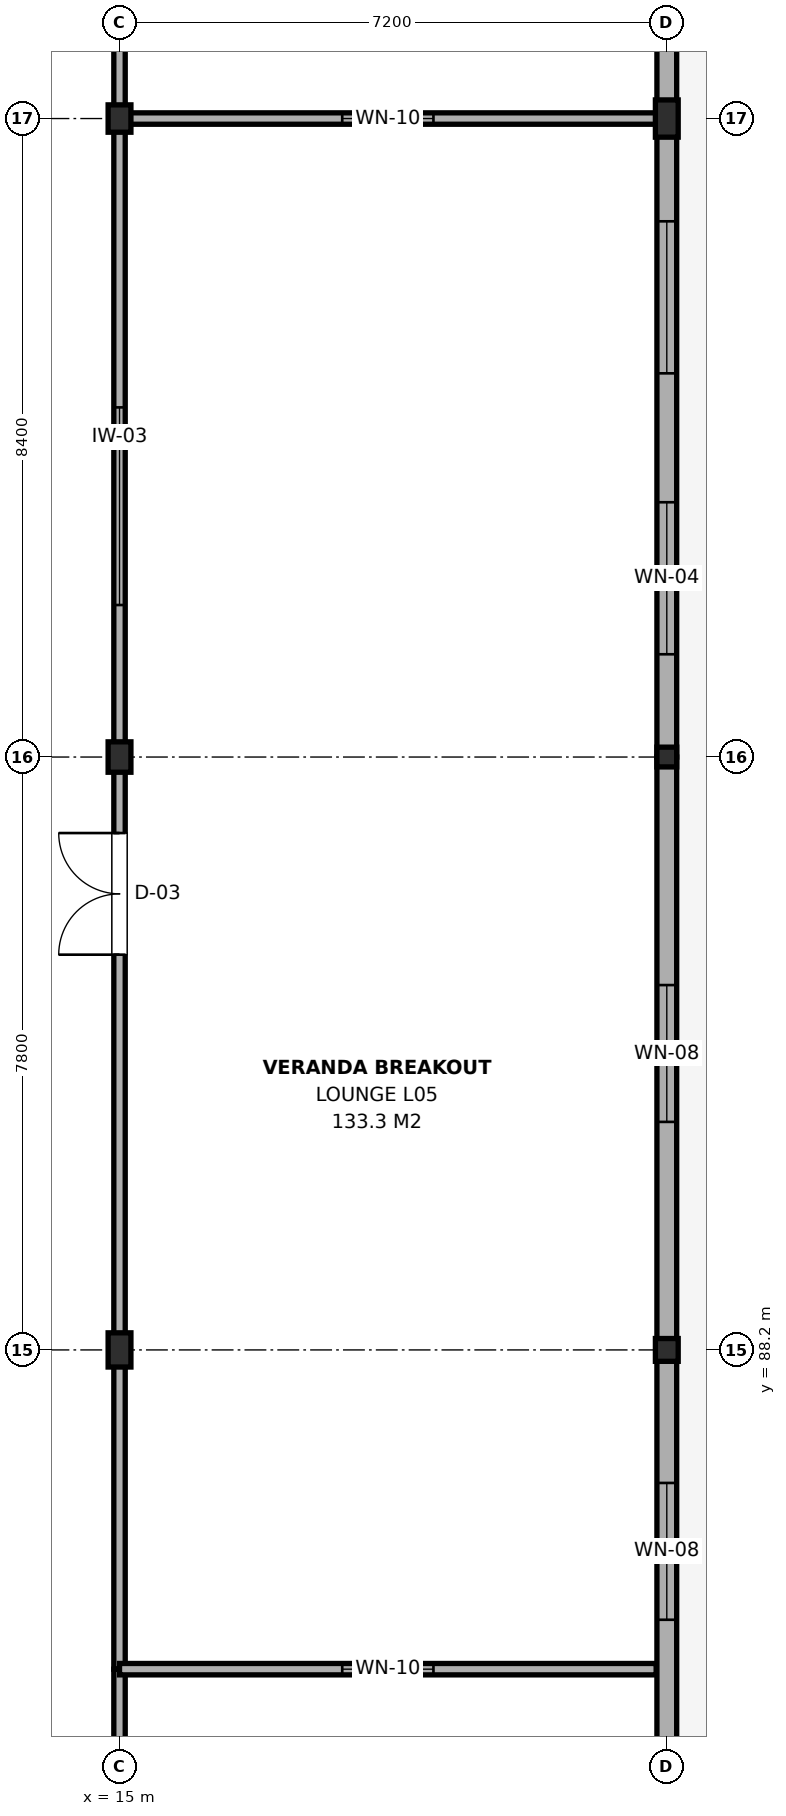
"""IFC4 building model, lengths in metres.
Left out: names, types, materials, properties, quantities, classifications, styles, units other than length and angle.
Written with IfcOpenShell. Run it as: python <this file> out.ifc"""

import sys

from ifc_helpers import new_model, si_unit, direction, frame, frame_2d, origin, origin_2d, place, context, subcontext, project, spatial, rectangle, i_section, extrude, element, fill, save


model = new_model("IFC4")
c1 = context("Model", 3, precision=1e-05, world=origin(), true_north=direction((0.0, 1.0)))
c2 = subcontext(c1, "Body", "Model", "MODEL_VIEW")
j1 = project(units=[si_unit("LENGTHUNIT", "METRE"), si_unit("PLANEANGLEUNIT", "RADIAN")], contexts=[c1])
p1 = place(None, origin())
s1 = spatial("IfcSite", under=j1, at=p1, CompositionType="ELEMENT")
p2 = place(p1, origin())
s2 = spatial("IfcBuilding", under=s1, at=p2, CompositionType="ELEMENT")
p3 = place(p2, frame((0.0, 0.0, 21.0)))
s3 = spatial("IfcBuildingStorey", under=s2, at=p3, CompositionType="ELEMENT", Elevation=21.0)
p4 = place(p3, frame((15.0, 88.2, 0.0), z_axis=(0.0, 0.0, 1.0), x_axis=(1.0, 0.0, 0.0)))
e1 = element("IfcColumn", 1, at=p4, inside=s3, PredefinedType="COLUMN", context=c2, shape_type="SweptSolid", body=[
    extrude(i_section(OverallWidth=0.3, OverallDepth=0.45, WebThickness=0.014, FlangeThickness=0.026, FilletRadius=0.027, at=origin_2d()), origin(), (0.0, 0.0, 1.0), 3.9),
])
p5 = place(p3, frame((15.0, 96.0, 0.0), z_axis=(0.0, 0.0, 1.0), x_axis=(1.0, 0.0, 0.0)))
e2 = element("IfcColumn", 2, at=p5, inside=s3, PredefinedType="COLUMN", context=c2, shape_type="SweptSolid", body=[
    extrude(i_section(OverallWidth=0.3, OverallDepth=0.4, WebThickness=0.013, FlangeThickness=0.024, FilletRadius=0.027, at=origin_2d()), origin(), (0.0, 0.0, 1.0), 3.9),
])
p6 = place(p3, frame((15.0, 104.4, 0.0), z_axis=(0.0, 0.0, 1.0), x_axis=(1.0, 0.0, 0.0)))
e3 = element("IfcColumn", 3, at=p6, inside=s3, PredefinedType="COLUMN", context=c2, shape_type="SweptSolid", body=[
    extrude(i_section(OverallWidth=0.3, OverallDepth=0.36, WebThickness=0.012, FlangeThickness=0.022, FilletRadius=0.027, at=origin_2d()), origin(), (0.0, 0.0, 1.0), 3.9),
])
p7 = place(p3, frame((22.2, 88.2, 0.0), z_axis=(0.0, 0.0, 1.0), x_axis=(1.0, 0.0, 0.0)))
e4 = element("IfcColumn", 4, at=p7, inside=s3, PredefinedType="COLUMN", context=c2, shape_type="SweptSolid", body=[
    extrude(i_section(OverallWidth=0.3, OverallDepth=0.3, WebThickness=0.011, FlangeThickness=0.019, FilletRadius=0.027, at=origin_2d()), origin(), (0.0, 0.0, 1.0), 3.9),
])
p8 = place(p3, frame((22.2, 96.0, 0.0), z_axis=(0.0, 0.0, 1.0), x_axis=(1.0, 0.0, 0.0)))
e5 = element("IfcColumn", 5, at=p8, inside=s3, PredefinedType="COLUMN", context=c2, shape_type="SweptSolid", body=[
    extrude(i_section(OverallWidth=0.26, OverallDepth=0.26, WebThickness=0.01, FlangeThickness=0.018, FilletRadius=0.024, at=origin_2d()), origin(), (0.0, 0.0, 1.0), 3.9),
])
p9 = place(p3, frame((22.2, 104.4, 0.0), z_axis=(0.0, 0.0, 1.0), x_axis=(1.0, 0.0, 0.0)))
e6 = element("IfcColumn", 6, at=p9, inside=s3, PredefinedType="COLUMN", context=c2, shape_type="SweptSolid", body=[
    extrude(i_section(OverallWidth=0.3, OverallDepth=0.49, WebThickness=0.012, FlangeThickness=0.023, FilletRadius=0.027, at=origin_2d()), origin(), (0.0, 0.0, 1.0), 3.9),
])
p10 = place(p3, frame((22.2, 81.0, 0.0), z_axis=(0.0, 0.0, 1.0), x_axis=(0.0, 1.0, 0.0)))
e7 = element("IfcWall", 7, at=p10, inside=s3, PredefinedType="SOLIDWALL", context=c2, shape_type="SweptSolid", body=[
    extrude(rectangle(XDim=7.2, YDim=0.26, at=frame_2d((3.6, 0.0))), origin(), (0.0, 0.0, 1.0), 3.095),
])
p11 = place(p10, frame((3.65, 0.0, 0.65)))
e8 = element("IfcOpeningElement", 8, at=p11, cuts=e7, PredefinedType="OPENING", context=c2, shape_type="SweptSolid", body=[
    extrude(rectangle(XDim=1.8, YDim=1.2, at=frame_2d((0.9, 0.6))), frame((0.0, 0.145, 0.0), z_axis=(0.0, -1.0, 0.0), x_axis=(1.0, 0.0, 0.0)), (0.0, 0.0, 1.0), 0.29),
])
p12 = place(p3, frame((22.2, 88.2, 0.0), z_axis=(0.0, 0.0, 1.0), x_axis=(0.0, 1.0, 0.0)))
e9 = element("IfcWall", 9, at=p12, inside=s3, PredefinedType="SOLIDWALL", context=c2, shape_type="SweptSolid", body=[
    extrude(rectangle(XDim=7.8, YDim=0.26, at=frame_2d((3.9, 0.0))), origin(), (0.0, 0.0, 1.0), 3.145),
])
p13 = place(p12, frame((3.0, 0.0, 0.65)))
e10 = element("IfcOpeningElement", 10, at=p13, cuts=e9, PredefinedType="OPENING", context=c2, shape_type="SweptSolid", body=[
    extrude(rectangle(XDim=1.8, YDim=1.2, at=frame_2d((0.9, 0.6))), frame((0.0, 0.145, 0.0), z_axis=(0.0, -1.0, 0.0), x_axis=(1.0, 0.0, 0.0)), (0.0, 0.0, 1.0), 0.29),
])
p14 = place(p3, frame((22.2, 96.0, 0.0), z_axis=(0.0, 0.0, 1.0), x_axis=(0.0, 1.0, 0.0)))
e11 = element("IfcWall", 11, at=p14, inside=s3, PredefinedType="SOLIDWALL", context=c2, shape_type="SweptSolid", body=[
    extrude(rectangle(XDim=8.4, YDim=0.26, at=frame_2d((4.2, 0.0))), origin(), (0.0, 0.0, 1.0), 3.105),
])
p15 = place(p14, frame((1.352, 0.0, 0.65)))
e12 = element("IfcOpeningElement", 12, at=p15, cuts=e11, PredefinedType="OPENING", context=c2, shape_type="SweptSolid", body=[
    extrude(rectangle(XDim=2.0, YDim=1.8, at=frame_2d((1.0, 0.9))), frame((0.0, 0.145, 0.0), z_axis=(0.0, -1.0, 0.0), x_axis=(1.0, 0.0, 0.0)), (0.0, 0.0, 1.0), 0.29),
])
p16 = place(p14, frame((5.048, 0.0, 0.65)))
e13 = element("IfcOpeningElement", 13, at=p16, cuts=e11, PredefinedType="OPENING", context=c2, shape_type="SweptSolid", body=[
    extrude(rectangle(XDim=2.0, YDim=1.8, at=frame_2d((1.0, 0.9))), frame((0.0, 0.145, 0.0), z_axis=(0.0, -1.0, 0.0), x_axis=(1.0, 0.0, 0.0)), (0.0, 0.0, 1.0), 0.29),
])
p17 = place(p3, frame((22.2, 104.4, 0.0), z_axis=(0.0, 0.0, 1.0), x_axis=(0.0, 1.0, 0.0)))
e14 = element("IfcWall", 14, at=p17, inside=s3, PredefinedType="SOLIDWALL", context=c2, shape_type="SweptSolid", body=[
    extrude(rectangle(XDim=9.0, YDim=0.26, at=frame_2d((4.5, 0.0))), origin(), (0.0, 0.0, 1.0), 3.105),
])
p18 = place(p17, frame((1.52, 0.0, 0.65)))
e15 = element("IfcOpeningElement", 15, at=p18, cuts=e14, PredefinedType="OPENING", context=c2, shape_type="SweptSolid", body=[
    extrude(rectangle(XDim=2.0, YDim=1.8, at=frame_2d((1.0, 0.9))), frame((0.0, 0.145, 0.0), z_axis=(0.0, -1.0, 0.0), x_axis=(1.0, 0.0, 0.0)), (0.0, 0.0, 1.0), 0.29),
])
p19 = place(p17, frame((5.48, 0.0, 0.65)))
e16 = element("IfcOpeningElement", 16, at=p19, cuts=e14, PredefinedType="OPENING", context=c2, shape_type="SweptSolid", body=[
    extrude(rectangle(XDim=2.0, YDim=1.8, at=frame_2d((1.0, 0.9))), frame((0.0, 0.145, 0.0), z_axis=(0.0, -1.0, 0.0), x_axis=(1.0, 0.0, 0.0)), (0.0, 0.0, 1.0), 0.29),
])
p20 = place(p3, frame((15.0, 66.6, 0.0), z_axis=(0.0, 0.0, 1.0), x_axis=(0.0, 1.0, 0.0)))
e17 = element("IfcWall", 17, at=p20, inside=s3, PredefinedType="PARTITIONING", context=c2, shape_type="SweptSolid", body=[
    extrude(rectangle(XDim=17.4, YDim=0.15, at=frame_2d((8.7, 0.0))), origin(), (0.0, 0.0, 1.0), 3.095),
])
p21 = place(p20, frame((8.175, 0.0, 0.0)))
e18 = element("IfcOpeningElement", 18, at=p21, cuts=e17, PredefinedType="OPENING", context=c2, shape_type="SweptSolid", body=[
    extrude(rectangle(XDim=1.05, YDim=2.15, at=frame_2d((0.525, 1.075))), frame((0.0, 0.09, 0.0), z_axis=(0.0, -1.0, 0.0), x_axis=(1.0, 0.0, 0.0)), (0.0, 0.0, 1.0), 0.18),
])
p22 = place(p20, frame((3.05, 0.0, 0.95)))
e19 = element("IfcOpeningElement", 19, at=p22, cuts=e17, PredefinedType="OPENING", context=c2, shape_type="SweptSolid", body=[
    extrude(rectangle(XDim=2.6, YDim=1.5, at=frame_2d((1.3, 0.75))), frame((0.0, 0.09, 0.0), z_axis=(0.0, -1.0, 0.0), x_axis=(1.0, 0.0, 0.0)), (0.0, 0.0, 1.0), 0.18),
])
p23 = place(p3, frame((15.0, 84.0, 0.0), z_axis=(0.0, 0.0, 1.0), x_axis=(0.0, 1.0, 0.0)))
e20 = element("IfcWall", 20, at=p23, inside=s3, PredefinedType="PARTITIONING", context=c2, shape_type="SweptSolid", body=[
    extrude(rectangle(XDim=20.4, YDim=0.15, at=frame_2d((10.2, 0.0))), origin(), (0.0, 0.0, 1.0), 3.095),
])
p24 = place(p23, frame((9.4, 0.0, 0.0)))
e21 = element("IfcOpeningElement", 21, at=p24, cuts=e20, PredefinedType="OPENING", context=c2, shape_type="SweptSolid", body=[
    extrude(rectangle(XDim=1.6, YDim=2.15, at=frame_2d((0.8, 1.075))), frame((0.0, 0.09, 0.0), z_axis=(0.0, -1.0, 0.0), x_axis=(1.0, 0.0, 0.0)), (0.0, 0.0, 1.0), 0.18),
])
p25 = place(p23, frame((14.0, 0.0, 0.95)))
e22 = element("IfcOpeningElement", 22, at=p25, cuts=e20, PredefinedType="OPENING", context=c2, shape_type="SweptSolid", body=[
    extrude(rectangle(XDim=2.6, YDim=1.5, at=frame_2d((1.3, 0.75))), frame((0.0, 0.09, 0.0), z_axis=(0.0, -1.0, 0.0), x_axis=(1.0, 0.0, 0.0)), (0.0, 0.0, 1.0), 0.18),
])
p26 = place(p3, frame((15.0, 84.0, 0.0), z_axis=(0.0, 0.0, 1.0), x_axis=(1.0, 0.0, 0.0)))
e23 = element("IfcWall", 23, at=p26, inside=s3, PredefinedType="PARTITIONING", context=c2, shape_type="SweptSolid", body=[
    extrude(rectangle(XDim=7.06, YDim=0.15, at=frame_2d((3.53, 0.0))), origin(), (0.0, 0.0, 1.0), 3.145),
])
p27 = place(p26, frame((2.93, 0.0, 0.95)))
e24 = element("IfcOpeningElement", 24, at=p27, cuts=e23, PredefinedType="OPENING", context=c2, shape_type="SweptSolid", body=[
    extrude(rectangle(XDim=1.2, YDim=1.5, at=frame_2d((0.6, 0.75))), frame((0.0, 0.09, 0.0), z_axis=(0.0, -1.0, 0.0), x_axis=(1.0, 0.0, 0.0)), (0.0, 0.0, 1.0), 0.18),
])
p28 = place(p3, frame((15.0, 104.4, 0.0), z_axis=(0.0, 0.0, 1.0), x_axis=(0.0, 1.0, 0.0)))
e25 = element("IfcWall", 25, at=p28, inside=s3, PredefinedType="PARTITIONING", context=c2, shape_type="SweptSolid", body=[
    extrude(rectangle(XDim=16.6, YDim=0.15, at=frame_2d((8.3, 0.0))), origin(), (0.0, 0.0, 1.0), 3.095),
])
p29 = place(p28, frame((7.05, 0.0, 0.0)))
e26 = element("IfcOpeningElement", 26, at=p29, cuts=e25, PredefinedType="OPENING", context=c2, shape_type="SweptSolid", body=[
    extrude(rectangle(XDim=1.6, YDim=2.15, at=frame_2d((0.8, 1.075))), frame((0.0, 0.09, 0.0), z_axis=(0.0, -1.0, 0.0), x_axis=(1.0, 0.0, 0.0)), (0.0, 0.0, 1.0), 0.18),
])
p30 = place(p28, frame((2.85, 0.0, 0.95)))
e27 = element("IfcOpeningElement", 27, at=p30, cuts=e25, PredefinedType="OPENING", context=c2, shape_type="SweptSolid", body=[
    extrude(rectangle(XDim=2.6, YDim=1.5, at=frame_2d((1.3, 0.75))), frame((0.0, 0.09, 0.0), z_axis=(0.0, -1.0, 0.0), x_axis=(1.0, 0.0, 0.0)), (0.0, 0.0, 1.0), 0.18),
])
p31 = place(p28, frame((11.15, 0.0, 0.95)))
e28 = element("IfcOpeningElement", 28, at=p31, cuts=e25, PredefinedType="OPENING", context=c2, shape_type="SweptSolid", body=[
    extrude(rectangle(XDim=2.6, YDim=1.5, at=frame_2d((1.3, 0.75))), frame((0.0, 0.09, 0.0), z_axis=(0.0, -1.0, 0.0), x_axis=(1.0, 0.0, 0.0)), (0.0, 0.0, 1.0), 0.18),
])
p32 = place(p3, frame((15.0, 104.4, 0.0), z_axis=(0.0, 0.0, 1.0), x_axis=(1.0, 0.0, 0.0)))
e29 = element("IfcWall", 29, at=p32, inside=s3, PredefinedType="PARTITIONING", context=c2, shape_type="SweptSolid", body=[
    extrude(rectangle(XDim=7.06, YDim=0.15, at=frame_2d((3.53, 0.0))), origin(), (0.0, 0.0, 1.0), 3.095),
])
p33 = place(p32, frame((2.93, 0.0, 0.95)))
e30 = element("IfcOpeningElement", 30, at=p33, cuts=e29, PredefinedType="OPENING", context=c2, shape_type="SweptSolid", body=[
    extrude(rectangle(XDim=1.2, YDim=1.5, at=frame_2d((0.6, 0.75))), frame((0.0, 0.09, 0.0), z_axis=(0.0, -1.0, 0.0), x_axis=(1.0, 0.0, 0.0)), (0.0, 0.0, 1.0), 0.18),
])
p34 = place(p11, origin())
e31 = element("IfcWindow", 31, at=p34, inside=s3, PartitioningType="SINGLE_PANEL", PredefinedType="WINDOW", context=c2, shape_type="SweptSolid", body=[
    extrude(rectangle(XDim=1.8, YDim=1.2, at=frame_2d((0.9, 0.6))), frame((0.0, 0.03, 0.0), z_axis=(0.0, -1.0, 0.0), x_axis=(1.0, 0.0, 0.0)), (0.0, 0.0, 1.0), 0.06),
])
fill(e8, e31)
p35 = place(p13, origin())
e32 = element("IfcWindow", 32, at=p35, inside=s3, PartitioningType="SINGLE_PANEL", PredefinedType="WINDOW", context=c2, shape_type="SweptSolid", body=[
    extrude(rectangle(XDim=1.8, YDim=1.2, at=frame_2d((0.9, 0.6))), frame((0.0, 0.03, 0.0), z_axis=(0.0, -1.0, 0.0), x_axis=(1.0, 0.0, 0.0)), (0.0, 0.0, 1.0), 0.06),
])
fill(e10, e32)
p36 = place(p15, origin())
e33 = element("IfcWindow", 33, at=p36, inside=s3, PartitioningType="SINGLE_PANEL", PredefinedType="WINDOW", context=c2, shape_type="SweptSolid", body=[
    extrude(rectangle(XDim=2.0, YDim=1.8, at=frame_2d((1.0, 0.9))), frame((0.0, 0.03, 0.0), z_axis=(0.0, -1.0, 0.0), x_axis=(1.0, 0.0, 0.0)), (0.0, 0.0, 1.0), 0.06),
])
fill(e12, e33)
p37 = place(p16, origin())
e34 = element("IfcWindow", 34, at=p37, inside=s3, PartitioningType="SINGLE_PANEL", PredefinedType="WINDOW", context=c2, shape_type="SweptSolid", body=[
    extrude(rectangle(XDim=2.0, YDim=1.8, at=frame_2d((1.0, 0.9))), frame((0.0, 0.03, 0.0), z_axis=(0.0, -1.0, 0.0), x_axis=(1.0, 0.0, 0.0)), (0.0, 0.0, 1.0), 0.06),
])
fill(e13, e34)
p38 = place(p24, origin())
e35 = element("IfcDoor", 35, at=p38, inside=s3, OperationType="DOUBLE_DOOR_SINGLE_SWING", PredefinedType="DOOR", context=c2, shape_type="SweptSolid", body=[
    extrude(rectangle(XDim=1.6, YDim=2.15, at=frame_2d((0.8, 1.075))), frame((0.0, 0.025, 0.0), z_axis=(0.0, -1.0, 0.0), x_axis=(1.0, 0.0, 0.0)), (0.0, 0.0, 1.0), 0.05),
])
fill(e21, e35)
p39 = place(p25, origin())
e36 = element("IfcWindow", 36, at=p39, inside=s3, PartitioningType="SINGLE_PANEL", PredefinedType="WINDOW", context=c2, shape_type="SweptSolid", body=[
    extrude(rectangle(XDim=2.6, YDim=1.5, at=frame_2d((1.3, 0.75))), frame((0.0, 0.03, 0.0), z_axis=(0.0, -1.0, 0.0), x_axis=(1.0, 0.0, 0.0)), (0.0, 0.0, 1.0), 0.06),
])
fill(e22, e36)
p40 = place(p27, origin())
e37 = element("IfcWindow", 37, at=p40, inside=s3, PartitioningType="SINGLE_PANEL", PredefinedType="WINDOW", context=c2, shape_type="SweptSolid", body=[
    extrude(rectangle(XDim=1.2, YDim=1.5, at=frame_2d((0.6, 0.75))), frame((0.0, 0.03, 0.0), z_axis=(0.0, -1.0, 0.0), x_axis=(1.0, 0.0, 0.0)), (0.0, 0.0, 1.0), 0.06),
])
fill(e24, e37)
p41 = place(p33, origin())
e38 = element("IfcWindow", 38, at=p41, inside=s3, PartitioningType="SINGLE_PANEL", PredefinedType="WINDOW", context=c2, shape_type="SweptSolid", body=[
    extrude(rectangle(XDim=1.2, YDim=1.5, at=frame_2d((0.6, 0.75))), frame((0.0, 0.03, 0.0), z_axis=(0.0, -1.0, 0.0), x_axis=(1.0, 0.0, 0.0)), (0.0, 0.0, 1.0), 0.06),
])
fill(e30, e38)
save(model, sys.argv[1])
